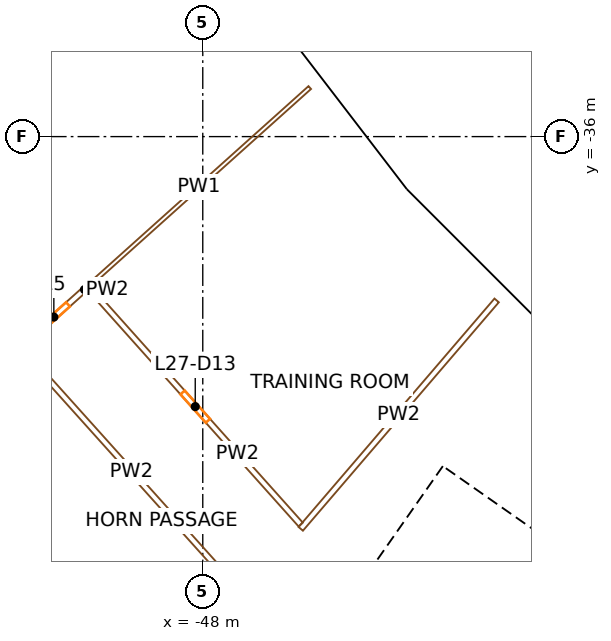
"""IFC4 building model, lengths in metres.
Left out: names, types, materials, properties, quantities, classifications, styles, units other than length and angle.
Written with IfcOpenShell. Run it as: python <this file> out.ifc"""

import sys

from ifc_helpers import new_model, si_unit, direction, frame, frame_2d, origin, origin_2d, place, context, subcontext, project, spatial, rectangle, extrude, element, fill, save


model = new_model("IFC4")
c1 = context("Model", 3, precision=1e-05, world=origin(), true_north=direction((0.0, 1.0)))
c2 = subcontext(c1, "Body", "Model", "MODEL_VIEW")
j1 = project(units=[si_unit("LENGTHUNIT", "METRE"), si_unit("PLANEANGLEUNIT", "RADIAN")], contexts=[c1])
p1 = place(None, origin())
s1 = spatial("IfcSite", under=j1, at=p1, CompositionType="ELEMENT")
p2 = place(p1, origin())
s2 = spatial("IfcBuilding", under=s1, at=p2, CompositionType="ELEMENT")
p3 = place(p2, frame((0.0, 0.0, 121.5)))
s3 = spatial("IfcBuildingStorey", under=s2, at=p3, CompositionType="ELEMENT", Elevation=121.5)
for number, where, z_axis, x_axis in (
    (1, (-43.795, -38.407, 0.0), (0.0, 0.0, 1.0), (0.659, -0.752, 0.0)),
    (2, (-38.407, -43.795, 0.0), (0.0, 0.0, 1.0), (0.752, -0.659, 0.0)),
):
    element("IfcColumn", number, at=place(p3, frame(where, z_axis=z_axis, x_axis=x_axis)), inside=s3, PredefinedType="COLUMN", context=c2, shape_type="SweptSolid", body=[
        extrude(rectangle(XDim=1.2, YDim=1.5, at=origin_2d()), origin(), (0.0, 0.0, 1.0), 3.8),
    ])
p4 = place(p3, frame((-49.779, -57.191, 0.0), z_axis=(0.0, 0.0, 1.0), x_axis=(0.573577477574, 0.819151315216, 0.0)))
e3 = element("IfcWall", 3, at=p4, inside=s3, PredefinedType="SHEAR", context=c2, shape_type="SweptSolid", body=[
    extrude(rectangle(XDim=14.8, YDim=0.9, at=frame_2d((7.4, 0.0))), origin(), (0.0, 0.0, 1.0), 3.5),
])
p5 = place(p4, frame((6.7, 0.0, 0.0)))
e4 = element("IfcOpeningElement", 4, at=p5, cuts=e3, PredefinedType="OPENING", context=c2, shape_type="SweptSolid", body=[
    extrude(rectangle(XDim=1.4, YDim=2.1, at=frame_2d((0.7, 1.05))), frame((0.0, 0.46, 0.0), z_axis=(0.0, -1.0, 0.0), x_axis=(1.0, 0.0, 0.0)), (0.0, 0.0, 1.0), 0.92),
])
p6 = place(p3, frame((-28.854, -54.324, 0.0), z_axis=(0.0, 0.0, 1.0), x_axis=(-0.819145767589, 0.573585400304, 0.0)))
e5 = element("IfcWall", 5, at=p6, inside=s3, PredefinedType="SHEAR", context=c2, shape_type="SweptSolid", body=[
    extrude(rectangle(XDim=15.045, YDim=0.9, at=frame_2d((7.523, 0.0))), origin(), (0.0, 0.0, 1.0), 3.5),
])
p7 = place(p6, frame((0.6, 0.0, 0.0)))
e6 = element("IfcOpeningElement", 6, at=p7, cuts=e5, PredefinedType="OPENING", context=c2, shape_type="SweptSolid", body=[
    extrude(rectangle(XDim=1.0, YDim=2.1, at=frame_2d((0.5, 1.05))), frame((0.0, 0.46, 0.0), z_axis=(0.0, -1.0, 0.0), x_axis=(1.0, 0.0, 0.0)), (0.0, 0.0, 1.0), 0.92),
])
p8 = place(p6, frame((3.275, 0.0, 0.0)))
e7 = element("IfcOpeningElement", 7, at=p8, cuts=e5, PredefinedType="OPENING", context=c2, shape_type="SweptSolid", body=[
    extrude(rectangle(XDim=1.0, YDim=2.1, at=frame_2d((0.5, 1.05))), frame((0.0, 0.46, 0.0), z_axis=(0.0, -1.0, 0.0), x_axis=(1.0, 0.0, 0.0)), (0.0, 0.0, 1.0), 0.92),
])
p9 = place(p6, frame((6.225, 0.0, 0.0)))
e8 = element("IfcOpeningElement", 8, at=p9, cuts=e5, PredefinedType="OPENING", context=c2, shape_type="SweptSolid", body=[
    extrude(rectangle(XDim=0.9, YDim=2.1, at=frame_2d((0.45, 1.05))), frame((0.0, 0.46, 0.0), z_axis=(0.0, -1.0, 0.0), x_axis=(1.0, 0.0, 0.0)), (0.0, 0.0, 1.0), 0.92),
])
p10 = place(p6, frame((13.495, 0.0, 0.0)))
e9 = element("IfcOpeningElement", 9, at=p10, cuts=e5, PredefinedType="OPENING", context=c2, shape_type="SweptSolid", body=[
    extrude(rectangle(XDim=1.1, YDim=2.1, at=frame_2d((0.55, 1.05))), frame((0.0, 0.46, 0.0), z_axis=(0.0, -1.0, 0.0), x_axis=(1.0, 0.0, 0.0)), (0.0, 0.0, 1.0), 0.92),
])
p11 = place(p3, frame((-42.765, -37.537, 0.0), z_axis=(0.0, 0.0, 1.0), x_axis=(-0.608748204711, 0.793363487476, 0.0)))
e10 = element("IfcWall", 10, at=p11, inside=s3, PredefinedType="SOLIDWALL", context=c2, shape_type="SweptSolid", body=[
    extrude(rectangle(XDim=7.493, YDim=0.4, at=frame_2d((3.747, 0.0))), origin(), (0.0, 0.0, 1.0), 2.7),
])
p12 = place(p11, frame((4.301, 0.0, 0.9)))
e11 = element("IfcOpeningElement", 11, at=p12, cuts=e10, PredefinedType="OPENING", context=c2, shape_type="SweptSolid", body=[
    extrude(rectangle(XDim=2.6, YDim=1.65, at=frame_2d((1.3, 0.825))), frame((0.0, 0.21, 0.0), z_axis=(0.0, -1.0, 0.0), x_axis=(1.0, 0.0, 0.0)), (0.0, 0.0, 1.0), 0.42),
])
p13 = place(p11, frame((0.592, 0.0, 0.9)))
e12 = element("IfcOpeningElement", 12, at=p13, cuts=e10, PredefinedType="OPENING", context=c2, shape_type="SweptSolid", body=[
    extrude(rectangle(XDim=2.6, YDim=1.65, at=frame_2d((1.3, 0.825))), frame((0.0, 0.21, 0.0), z_axis=(0.0, -1.0, 0.0), x_axis=(1.0, 0.0, 0.0)), (0.0, 0.0, 1.0), 0.42),
])
p14 = place(p3, frame((-37.553, -42.744, 0.0), z_axis=(0.0, 0.0, 1.0), x_axis=(-0.707106781187, 0.707106781187, 0.0)))
e13 = element("IfcWall", 13, at=p14, inside=s3, PredefinedType="SOLIDWALL", context=c2, shape_type="SweptSolid", body=[
    extrude(rectangle(XDim=7.341, YDim=0.4, at=frame_2d((3.671, 0.0))), origin(), (0.0, 0.0, 1.0), 2.7),
])
p15 = place(p14, frame((4.225, 0.0, 0.9)))
e14 = element("IfcOpeningElement", 14, at=p15, cuts=e13, PredefinedType="OPENING", context=c2, shape_type="SweptSolid", body=[
    extrude(rectangle(XDim=2.6, YDim=1.65, at=frame_2d((1.3, 0.825))), frame((0.0, 0.21, 0.0), z_axis=(0.0, -1.0, 0.0), x_axis=(1.0, 0.0, 0.0)), (0.0, 0.0, 1.0), 0.42),
])
p16 = place(p14, frame((0.517, 0.0, 0.9)))
e15 = element("IfcOpeningElement", 15, at=p16, cuts=e13, PredefinedType="OPENING", context=c2, shape_type="SweptSolid", body=[
    extrude(rectangle(XDim=2.6, YDim=1.65, at=frame_2d((1.3, 0.825))), frame((0.0, 0.21, 0.0), z_axis=(0.0, -1.0, 0.0), x_axis=(1.0, 0.0, 0.0)), (0.0, 0.0, 1.0), 0.42),
])
p17 = place(p3, frame((-52.814, -41.552, 0.0), z_axis=(0.0, 0.0, 1.0), x_axis=(0.744484183784, 0.667640097729, 0.0)))
e16 = element("IfcWall", 16, at=p17, inside=s3, PredefinedType="PARTITIONING", context=c2, shape_type="SweptSolid", body=[
    extrude(rectangle(XDim=2.405, YDim=0.15, at=frame_2d((1.203, 0.0))), origin(), (0.0, 0.0, 1.0), 2.4),
])
p18 = place(p17, frame((0.703, 0.0, 0.0)))
e17 = element("IfcOpeningElement", 17, at=p18, cuts=e16, PredefinedType="OPENING", context=c2, shape_type="SweptSolid", body=[
    extrude(rectangle(XDim=1.0, YDim=2.1, at=frame_2d((0.5, 1.05))), frame((0.0, 0.085, 0.0), z_axis=(0.0, -1.0, 0.0), x_axis=(1.0, 0.0, 0.0)), (0.0, 0.0, 1.0), 0.17),
])
p19 = place(p3, frame((-51.023, -39.946, 0.0), z_axis=(0.0, 0.0, 1.0), x_axis=(0.744506479511, 0.667615234972, 0.0)))
e18 = element("IfcWall", 18, at=p19, inside=s3, PredefinedType="PARTITIONING", context=c2, shape_type="SweptSolid", body=[
    extrude(rectangle(XDim=7.843, YDim=0.1, at=frame_2d((3.921, 0.0))), origin(), (0.0, 0.0, 1.0), 2.4),
])
p20 = place(p3, frame((-46.989, -48.034, 0.0), z_axis=(0.0, 0.0, 1.0), x_axis=(-0.668407219478, 0.743795528993, 0.0)))
e19 = element("IfcWall", 19, at=p20, inside=s3, PredefinedType="PARTITIONING", context=c2, shape_type="SweptSolid", body=[
    extrude(rectangle(XDim=8.64, YDim=0.15, at=frame_2d((4.32, 0.0))), origin(), (0.0, 0.0, 1.0), 2.4),
])
p21 = place(p3, frame((-50.973, -40.002, 0.0), z_axis=(0.0, 0.0, 1.0), x_axis=(0.666630280457, -0.745388535716, 0.0)))
e20 = element("IfcWall", 20, at=p21, inside=s3, PredefinedType="PARTITIONING", context=c2, shape_type="SweptSolid", body=[
    extrude(rectangle(XDim=8.326, YDim=0.15, at=frame_2d((4.163, 0.0))), origin(), (0.0, 0.0, 1.0), 2.4),
])
p22 = place(p21, frame((3.663, 0.0, 0.0)))
e21 = element("IfcOpeningElement", 21, at=p22, cuts=e20, PredefinedType="OPENING", context=c2, shape_type="SweptSolid", body=[
    extrude(rectangle(XDim=1.0, YDim=2.1, at=frame_2d((0.5, 1.05))), frame((0.0, 0.085, 0.0), z_axis=(0.0, -1.0, 0.0), x_axis=(1.0, 0.0, 0.0)), (0.0, 0.0, 1.0), 0.17),
])
p23 = place(p3, frame((-40.268, -40.311, 0.0), z_axis=(0.0, 0.0, 1.0), x_axis=(-0.65098181151, -0.759093328309, 0.0)))
e22 = element("IfcWall", 22, at=p23, inside=s3, PredefinedType="PARTITIONING", context=c2, shape_type="SweptSolid", body=[
    extrude(rectangle(XDim=7.917, YDim=0.15, at=frame_2d((3.958, 0.0))), origin(), (0.0, 0.0, 1.0), 2.4),
])
p24 = place(p10, origin())
e23 = element("IfcDoor", 23, at=p24, inside=s3, OperationType="SINGLE_SWING_RIGHT", PredefinedType="DOOR", context=c2, shape_type="SweptSolid", body=[
    extrude(rectangle(XDim=1.1, YDim=2.1, at=frame_2d((0.55, 1.05))), frame((0.0, 0.025, 0.0), z_axis=(0.0, -1.0, 0.0), x_axis=(1.0, 0.0, 0.0)), (0.0, 0.0, 1.0), 0.05),
])
fill(e9, e23)
p25 = place(p12, origin())
e24 = element("IfcWindow", 24, at=p25, inside=s3, PartitioningType="SINGLE_PANEL", PredefinedType="WINDOW", context=c2, shape_type="SweptSolid", body=[
    extrude(rectangle(XDim=2.6, YDim=1.65, at=frame_2d((1.3, 0.825))), frame((0.0, 0.03, 0.0), z_axis=(0.0, -1.0, 0.0), x_axis=(1.0, 0.0, 0.0)), (0.0, 0.0, 1.0), 0.06),
])
fill(e11, e24)
p26 = place(p13, origin())
e25 = element("IfcWindow", 25, at=p26, inside=s3, PartitioningType="SINGLE_PANEL", PredefinedType="WINDOW", context=c2, shape_type="SweptSolid", body=[
    extrude(rectangle(XDim=2.6, YDim=1.65, at=frame_2d((1.3, 0.825))), frame((0.0, 0.03, 0.0), z_axis=(0.0, -1.0, 0.0), x_axis=(1.0, 0.0, 0.0)), (0.0, 0.0, 1.0), 0.06),
])
fill(e12, e25)
p27 = place(p15, origin())
e26 = element("IfcWindow", 26, at=p27, inside=s3, PartitioningType="SINGLE_PANEL", PredefinedType="WINDOW", context=c2, shape_type="SweptSolid", body=[
    extrude(rectangle(XDim=2.6, YDim=1.65, at=frame_2d((1.3, 0.825))), frame((0.0, 0.03, 0.0), z_axis=(0.0, -1.0, 0.0), x_axis=(1.0, 0.0, 0.0)), (0.0, 0.0, 1.0), 0.06),
])
fill(e14, e26)
p28 = place(p16, origin())
e27 = element("IfcWindow", 27, at=p28, inside=s3, PartitioningType="SINGLE_PANEL", PredefinedType="WINDOW", context=c2, shape_type="SweptSolid", body=[
    extrude(rectangle(XDim=2.6, YDim=1.65, at=frame_2d((1.3, 0.825))), frame((0.0, 0.03, 0.0), z_axis=(0.0, -1.0, 0.0), x_axis=(1.0, 0.0, 0.0)), (0.0, 0.0, 1.0), 0.06),
])
fill(e15, e27)
p29 = place(p22, origin())
e28 = element("IfcDoor", 28, at=p29, inside=s3, OperationType="SINGLE_SWING_RIGHT", PredefinedType="DOOR", context=c2, shape_type="SweptSolid", body=[
    extrude(rectangle(XDim=1.0, YDim=2.1, at=frame_2d((0.5, 1.05))), frame((0.0, 0.025, 0.0), z_axis=(0.0, -1.0, 0.0), x_axis=(1.0, 0.0, 0.0)), (0.0, 0.0, 1.0), 0.05),
])
fill(e21, e28)
p30 = place(p18, origin())
e29 = element("IfcDoor", 29, at=p30, inside=s3, OperationType="SINGLE_SWING_RIGHT", PredefinedType="DOOR", context=c2, shape_type="SweptSolid", body=[
    extrude(rectangle(XDim=1.0, YDim=2.1, at=frame_2d((0.5, 1.05))), frame((0.0, 0.025, 0.0), z_axis=(0.0, -1.0, 0.0), x_axis=(1.0, 0.0, 0.0)), (0.0, 0.0, 1.0), 0.05),
])
fill(e17, e29)
save(model, sys.argv[1])
